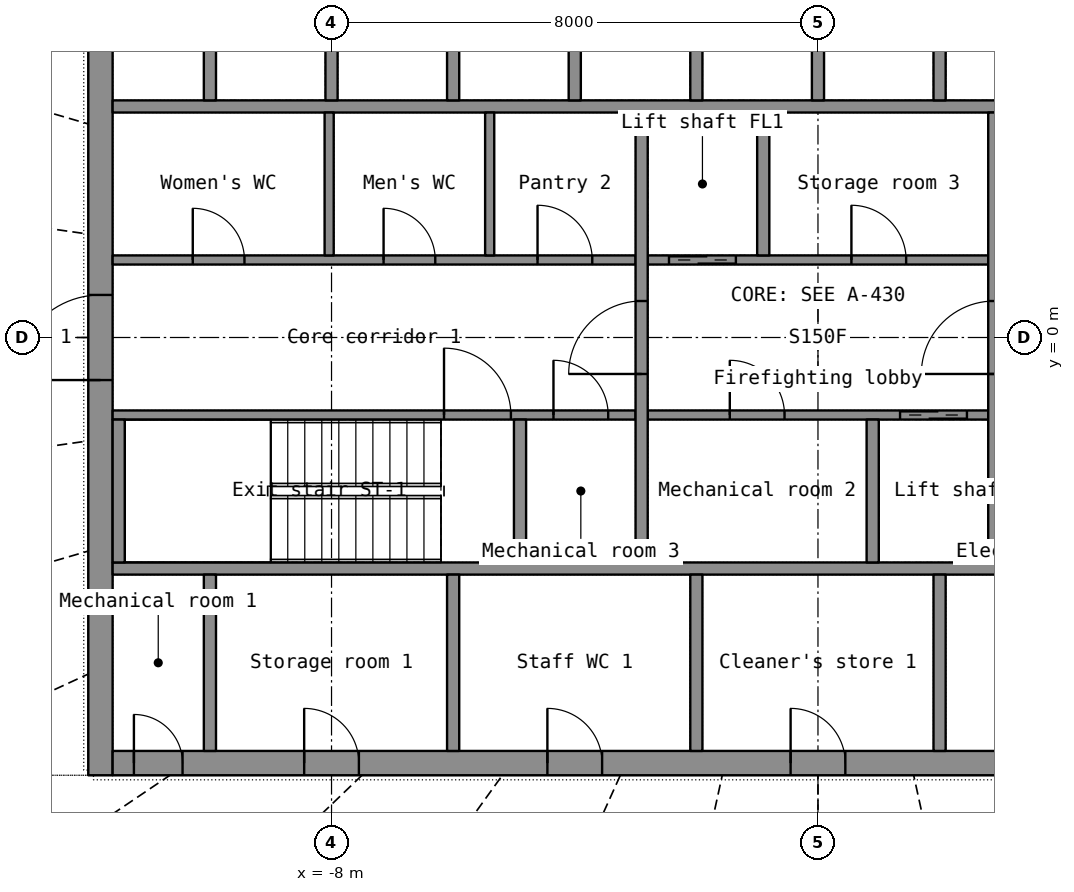
"""IFC4 building model, lengths in metres.
Left out: names, types, materials, properties, quantities, classifications, styles, units other than length and angle.
Written with IfcOpenShell. Run it as: python <this file> out.ifc"""

import sys

from ifc_helpers import new_model, si_unit, direction, frame, frame_2d, origin, place, context, subcontext, project, spatial, rectangle, extrude, element, fill, save


model = new_model("IFC4")
c1 = context("Model", 3, precision=1e-05, world=origin(), true_north=direction((0.0, 1.0)))
c2 = subcontext(c1, "Body", "Model", "MODEL_VIEW")
j1 = project(units=[si_unit("LENGTHUNIT", "METRE"), si_unit("PLANEANGLEUNIT", "RADIAN")], contexts=[c1])
p1 = place(None, origin())
s1 = spatial("IfcSite", under=j1, at=p1, CompositionType="ELEMENT")
p2 = place(p1, origin())
s2 = spatial("IfcBuilding", under=s1, at=p2, CompositionType="ELEMENT")
p3 = place(p2, frame((0.0, 0.0, 228.2)))
s3 = spatial("IfcBuildingStorey", under=s2, at=p3, CompositionType="ELEMENT", Elevation=228.2)
p4 = place(p3, frame((-11.8, -7.2, 0.0), z_axis=(0.0, 0.0, 1.0), x_axis=(0.0, 1.0, 0.0)))
e1 = element("IfcWall", 1, at=p4, inside=s3, PredefinedType="SHEAR", context=c2, shape_type="SweptSolid", body=[
    extrude(rectangle(XDim=14.4, YDim=0.4, at=frame_2d((7.2, 0.0))), origin(), (0.0, 0.0, 1.0), 3.3),
])
p5 = place(p4, frame((6.5, 0.0, 0.0)))
e2 = element("IfcOpeningElement", 2, at=p5, cuts=e1, PredefinedType="OPENING", context=c2, shape_type="SweptSolid", body=[
    extrude(rectangle(XDim=1.4, YDim=2.2, at=frame_2d((0.7, 1.1))), frame((0.0, 0.21, 0.0), z_axis=(0.0, -1.0, 0.0), x_axis=(1.0, 0.0, 0.0)), (0.0, 0.0, 1.0), 0.42),
])
p6 = place(p3, frame((-11.6, -7.0, 0.0), z_axis=(0.0, 0.0, 1.0), x_axis=(1.0, 0.0, 0.0)))
e3 = element("IfcWall", 3, at=p6, inside=s3, PredefinedType="SHEAR", context=c2, shape_type="SweptSolid", body=[
    extrude(rectangle(XDim=23.2, YDim=0.4, at=frame_2d((11.6, 0.0))), origin(), (0.0, 0.0, 1.0), 3.3),
])
p7 = place(p6, frame((20.05, 0.0, 0.0)))
e4 = element("IfcOpeningElement", 4, at=p7, cuts=e3, PredefinedType="OPENING", context=c2, shape_type="SweptSolid", body=[
    extrude(rectangle(XDim=1.1, YDim=2.2, at=frame_2d((0.55, 1.1))), frame((0.0, 0.21, 0.0), z_axis=(0.0, -1.0, 0.0), x_axis=(1.0, 0.0, 0.0)), (0.0, 0.0, 1.0), 0.42),
])
p8 = place(p6, frame((3.15, 0.0, 0.0)))
e5 = element("IfcOpeningElement", 5, at=p8, cuts=e3, PredefinedType="OPENING", context=c2, shape_type="SweptSolid", body=[
    extrude(rectangle(XDim=0.9, YDim=2.1, at=frame_2d((0.45, 1.05))), frame((0.0, 0.21, 0.0), z_axis=(0.0, -1.0, 0.0), x_axis=(1.0, 0.0, 0.0)), (0.0, 0.0, 1.0), 0.42),
])
p9 = place(p6, frame((7.15, 0.0, 0.0)))
e6 = element("IfcOpeningElement", 6, at=p9, cuts=e3, PredefinedType="OPENING", context=c2, shape_type="SweptSolid", body=[
    extrude(rectangle(XDim=0.9, YDim=2.1, at=frame_2d((0.45, 1.05))), frame((0.0, 0.21, 0.0), z_axis=(0.0, -1.0, 0.0), x_axis=(1.0, 0.0, 0.0)), (0.0, 0.0, 1.0), 0.42),
])
p10 = place(p6, frame((11.15, 0.0, 0.0)))
e7 = element("IfcOpeningElement", 7, at=p10, cuts=e3, PredefinedType="OPENING", context=c2, shape_type="SweptSolid", body=[
    extrude(rectangle(XDim=0.9, YDim=2.1, at=frame_2d((0.45, 1.05))), frame((0.0, 0.21, 0.0), z_axis=(0.0, -1.0, 0.0), x_axis=(1.0, 0.0, 0.0)), (0.0, 0.0, 1.0), 0.42),
])
p11 = place(p6, frame((16.15, 0.0, 0.0)))
e8 = element("IfcOpeningElement", 8, at=p11, cuts=e3, PredefinedType="OPENING", context=c2, shape_type="SweptSolid", body=[
    extrude(rectangle(XDim=0.9, YDim=2.1, at=frame_2d((0.45, 1.05))), frame((0.0, 0.21, 0.0), z_axis=(0.0, -1.0, 0.0), x_axis=(1.0, 0.0, 0.0)), (0.0, 0.0, 1.0), 0.42),
])
p12 = place(p6, frame((0.35, 0.0, 0.0)))
e9 = element("IfcOpeningElement", 9, at=p12, cuts=e3, PredefinedType="OPENING", context=c2, shape_type="SweptSolid", body=[
    extrude(rectangle(XDim=0.8, YDim=2.05, at=frame_2d((0.4, 1.025))), frame((0.0, 0.21, 0.0), z_axis=(0.0, -1.0, 0.0), x_axis=(1.0, 0.0, 0.0)), (0.0, 0.0, 1.0), 0.42),
])
p13 = place(p6, frame((22.05, 0.0, 0.0)))
e10 = element("IfcOpeningElement", 10, at=p13, cuts=e3, PredefinedType="OPENING", context=c2, shape_type="SweptSolid", body=[
    extrude(rectangle(XDim=0.8, YDim=2.05, at=frame_2d((0.4, 1.025))), frame((0.0, 0.21, 0.0), z_axis=(0.0, -1.0, 0.0), x_axis=(1.0, 0.0, 0.0)), (0.0, 0.0, 1.0), 0.42),
])
for number, where, z_axis, x_axis in (
    (11, (-11.6, -3.8, 0.0), (0.0, 0.0, 1.0), (1.0, 0.0, 0.0)),
    (12, (-11.6, 3.8, 0.0), (0.0, 0.0, 1.0), (1.0, 0.0, 0.0)),
):
    element("IfcWall", number, at=place(p3, frame(where, z_axis=z_axis, x_axis=x_axis)), inside=s3, PredefinedType="SHEAR", context=c2, shape_type="SweptSolid", body=[
        extrude(rectangle(XDim=23.2, YDim=0.2, at=frame_2d((11.6, 0.0))), origin(), (0.0, 0.0, 1.0), 3.3),
    ])
p14 = place(p3, frame((-10.0, -6.8, 0.0), z_axis=(0.0, 0.0, 1.0), x_axis=(0.0, 1.0, 0.0)))
e13 = element("IfcWall", 13, at=p14, inside=s3, PredefinedType="SHEAR", context=c2, shape_type="SweptSolid", body=[
    extrude(rectangle(XDim=2.9, YDim=0.2, at=frame_2d((1.45, 0.0))), origin(), (0.0, 0.0, 1.0), 3.3),
])
for number, where, z_axis, x_axis in (
    (14, (-6.0, -6.8, 0.0), (0.0, 0.0, 1.0), (0.0, 1.0, 0.0)),
    (15, (-2.0, -6.8, 0.0), (0.0, 0.0, 1.0), (0.0, 1.0, 0.0)),
    (16, (2.0, -6.8, 0.0), (0.0, 0.0, 1.0), (0.0, 1.0, 0.0)),
):
    element("IfcWall", number, at=place(p3, frame(where, z_axis=z_axis, x_axis=x_axis)), inside=s3, PredefinedType="PARTITIONING", context=c2, shape_type="SweptSolid", body=[
        extrude(rectangle(XDim=2.9, YDim=0.2, at=frame_2d((1.45, 0.0))), origin(), (0.0, 0.0, 1.0), 3.3),
    ])
for number, where, z_axis, x_axis in (
    (17, (-10.0, 3.9, 0.0), (0.0, 0.0, 1.0), (0.0, 1.0, 0.0)),
    (18, (-8.0, 3.9, 0.0), (0.0, 0.0, 1.0), (0.0, 1.0, 0.0)),
    (19, (-6.0, 3.9, 0.0), (0.0, 0.0, 1.0), (0.0, 1.0, 0.0)),
    (20, (-4.0, 3.9, 0.0), (0.0, 0.0, 1.0), (0.0, 1.0, 0.0)),
    (21, (-2.0, 3.9, 0.0), (0.0, 0.0, 1.0), (0.0, 1.0, 0.0)),
    (22, (0.0, 3.9, 0.0), (0.0, 0.0, 1.0), (0.0, 1.0, 0.0)),
    (23, (2.0, 3.9, 0.0), (0.0, 0.0, 1.0), (0.0, 1.0, 0.0)),
):
    element("IfcWall", number, at=place(p3, frame(where, z_axis=z_axis, x_axis=x_axis)), inside=s3, PredefinedType="SHEAR", context=c2, shape_type="SweptSolid", body=[
        extrude(rectangle(XDim=2.9, YDim=0.2, at=frame_2d((1.45, 0.0))), origin(), (0.0, 0.0, 1.0), 3.3),
    ])
p15 = place(p3, frame((-11.6, -1.275, 0.0), z_axis=(0.0, 0.0, 1.0), x_axis=(1.0, 0.0, 0.0)))
e24 = element("IfcWall", 24, at=p15, inside=s3, PredefinedType="SHEAR", context=c2, shape_type="SweptSolid", body=[
    extrude(rectangle(XDim=8.6, YDim=0.15, at=frame_2d((4.3, 0.0))), origin(), (0.0, 0.0, 1.0), 3.3),
])
p16 = place(p15, frame((5.45, 0.0, 0.0)))
e25 = element("IfcOpeningElement", 25, at=p16, cuts=e24, PredefinedType="OPENING", context=c2, shape_type="SweptSolid", body=[
    extrude(rectangle(XDim=1.1, YDim=2.15, at=frame_2d((0.55, 1.075))), frame((0.0, 0.085, 0.0), z_axis=(0.0, -1.0, 0.0), x_axis=(1.0, 0.0, 0.0)), (0.0, 0.0, 1.0), 0.17),
])
p17 = place(p15, frame((7.25, 0.0, 0.0)))
e26 = element("IfcOpeningElement", 26, at=p17, cuts=e24, PredefinedType="OPENING", context=c2, shape_type="SweptSolid", body=[
    extrude(rectangle(XDim=0.9, YDim=2.1, at=frame_2d((0.45, 1.05))), frame((0.0, 0.085, 0.0), z_axis=(0.0, -1.0, 0.0), x_axis=(1.0, 0.0, 0.0)), (0.0, 0.0, 1.0), 0.17),
])
p18 = place(p3, frame((-2.8, -1.275, 0.0), z_axis=(0.0, 0.0, 1.0), x_axis=(1.0, 0.0, 0.0)))
e27 = element("IfcWall", 27, at=p18, inside=s3, PredefinedType="SHEAR", context=c2, shape_type="SweptSolid", body=[
    extrude(rectangle(XDim=5.6, YDim=0.15, at=frame_2d((2.8, 0.0))), origin(), (0.0, 0.0, 1.0), 3.3),
])
p19 = place(p18, frame((4.15, 0.0, 0.0)))
e28 = element("IfcOpeningElement", 28, at=p19, cuts=e27, PredefinedType="OPENING", context=c2, shape_type="SweptSolid", body=[
    extrude(rectangle(XDim=1.1, YDim=2.2, at=frame_2d((0.55, 1.1))), frame((0.0, 0.085, 0.0), z_axis=(0.0, -1.0, 0.0), x_axis=(1.0, 0.0, 0.0)), (0.0, 0.0, 1.0), 0.17),
])
p20 = place(p18, frame((1.35, 0.0, 0.0)))
e29 = element("IfcOpeningElement", 29, at=p20, cuts=e27, PredefinedType="OPENING", context=c2, shape_type="SweptSolid", body=[
    extrude(rectangle(XDim=0.9, YDim=2.1, at=frame_2d((0.45, 1.05))), frame((0.0, 0.085, 0.0), z_axis=(0.0, -1.0, 0.0), x_axis=(1.0, 0.0, 0.0)), (0.0, 0.0, 1.0), 0.17),
])
p21 = place(p3, frame((-11.6, 1.275, 0.0), z_axis=(0.0, 0.0, 1.0), x_axis=(1.0, 0.0, 0.0)))
e30 = element("IfcWall", 30, at=p21, inside=s3, PredefinedType="PARTITIONING", context=c2, shape_type="SweptSolid", body=[
    extrude(rectangle(XDim=8.6, YDim=0.15, at=frame_2d((4.3, 0.0))), origin(), (0.0, 0.0, 1.0), 3.3),
])
p22 = place(p21, frame((1.318, 0.0, 0.0)))
e31 = element("IfcOpeningElement", 31, at=p22, cuts=e30, PredefinedType="OPENING", context=c2, shape_type="SweptSolid", body=[
    extrude(rectangle(XDim=0.85, YDim=2.1, at=frame_2d((0.425, 1.05))), frame((0.0, 0.085, 0.0), z_axis=(0.0, -1.0, 0.0), x_axis=(1.0, 0.0, 0.0)), (0.0, 0.0, 1.0), 0.17),
])
p23 = place(p21, frame((4.456, 0.0, 0.0)))
e32 = element("IfcOpeningElement", 32, at=p23, cuts=e30, PredefinedType="OPENING", context=c2, shape_type="SweptSolid", body=[
    extrude(rectangle(XDim=0.85, YDim=2.1, at=frame_2d((0.425, 1.05))), frame((0.0, 0.085, 0.0), z_axis=(0.0, -1.0, 0.0), x_axis=(1.0, 0.0, 0.0)), (0.0, 0.0, 1.0), 0.17),
])
p24 = place(p21, frame((6.988, 0.0, 0.0)))
e33 = element("IfcOpeningElement", 33, at=p24, cuts=e30, PredefinedType="OPENING", context=c2, shape_type="SweptSolid", body=[
    extrude(rectangle(XDim=0.9, YDim=2.1, at=frame_2d((0.45, 1.05))), frame((0.0, 0.085, 0.0), z_axis=(0.0, -1.0, 0.0), x_axis=(1.0, 0.0, 0.0)), (0.0, 0.0, 1.0), 0.17),
])
p25 = place(p3, frame((-2.8, 1.275, 0.0), z_axis=(0.0, 0.0, 1.0), x_axis=(1.0, 0.0, 0.0)))
e34 = element("IfcWall", 34, at=p25, inside=s3, PredefinedType="SHEAR", context=c2, shape_type="SweptSolid", body=[
    extrude(rectangle(XDim=5.6, YDim=0.15, at=frame_2d((2.8, 0.0))), origin(), (0.0, 0.0, 1.0), 3.3),
])
p26 = place(p25, frame((0.35, 0.0, 0.0)))
e35 = element("IfcOpeningElement", 35, at=p26, cuts=e34, PredefinedType="OPENING", context=c2, shape_type="SweptSolid", body=[
    extrude(rectangle(XDim=1.1, YDim=2.2, at=frame_2d((0.55, 1.1))), frame((0.0, 0.085, 0.0), z_axis=(0.0, -1.0, 0.0), x_axis=(1.0, 0.0, 0.0)), (0.0, 0.0, 1.0), 0.17),
])
p27 = place(p25, frame((3.35, 0.0, 0.0)))
e36 = element("IfcOpeningElement", 36, at=p27, cuts=e34, PredefinedType="OPENING", context=c2, shape_type="SweptSolid", body=[
    extrude(rectangle(XDim=0.9, YDim=2.1, at=frame_2d((0.45, 1.05))), frame((0.0, 0.085, 0.0), z_axis=(0.0, -1.0, 0.0), x_axis=(1.0, 0.0, 0.0)), (0.0, 0.0, 1.0), 0.17),
])
p28 = place(p3, frame((-2.9, -3.7, 0.0), z_axis=(0.0, 0.0, 1.0), x_axis=(0.0, 1.0, 0.0)))
e37 = element("IfcWall", 37, at=p28, inside=s3, PredefinedType="SHEAR", context=c2, shape_type="SweptSolid", body=[
    extrude(rectangle(XDim=7.4, YDim=0.2, at=frame_2d((3.7, 0.0))), origin(), (0.0, 0.0, 1.0), 3.3),
])
p29 = place(p28, frame((3.1, 0.0, 0.0)))
e38 = element("IfcOpeningElement", 38, at=p29, cuts=e37, PredefinedType="OPENING", context=c2, shape_type="SweptSolid", body=[
    extrude(rectangle(XDim=1.2, YDim=2.2, at=frame_2d((0.6, 1.1))), frame((0.0, 0.11, 0.0), z_axis=(0.0, -1.0, 0.0), x_axis=(1.0, 0.0, 0.0)), (0.0, 0.0, 1.0), 0.22),
])
p30 = place(p3, frame((2.9, -3.7, 0.0), z_axis=(0.0, 0.0, 1.0), x_axis=(0.0, 1.0, 0.0)))
e39 = element("IfcWall", 39, at=p30, inside=s3, PredefinedType="SHEAR", context=c2, shape_type="SweptSolid", body=[
    extrude(rectangle(XDim=7.4, YDim=0.2, at=frame_2d((3.7, 0.0))), origin(), (0.0, 0.0, 1.0), 3.3),
])
p31 = place(p30, frame((3.1, 0.0, 0.0)))
e40 = element("IfcOpeningElement", 40, at=p31, cuts=e39, PredefinedType="OPENING", context=c2, shape_type="SweptSolid", body=[
    extrude(rectangle(XDim=1.2, YDim=2.2, at=frame_2d((0.6, 1.1))), frame((0.0, 0.11, 0.0), z_axis=(0.0, -1.0, 0.0), x_axis=(1.0, 0.0, 0.0)), (0.0, 0.0, 1.0), 0.22),
])
for number, where, z_axis, x_axis in (
    (41, (-0.9, 1.35, 0.0), (0.0, 0.0, 1.0), (0.0, 1.0, 0.0)),
    (42, (0.9, -3.7, 0.0), (0.0, 0.0, 1.0), (0.0, 1.0, 0.0)),
    (43, (-11.5, -3.7, 0.0), (0.0, 0.0, 1.0), (0.0, 1.0, 0.0)),
    (44, (-4.9, -3.7, 0.0), (0.0, 0.0, 1.0), (0.0, 1.0, 0.0)),
):
    element("IfcWall", number, at=place(p3, frame(where, z_axis=z_axis, x_axis=x_axis)), inside=s3, PredefinedType="SHEAR", context=c2, shape_type="SweptSolid", body=[
        extrude(rectangle(XDim=2.35, YDim=0.2, at=frame_2d((1.175, 0.0))), origin(), (0.0, 0.0, 1.0), 3.3),
    ])
for number, where, z_axis, x_axis in (
    (45, (-8.039, 1.35, 0.0), (0.0, 0.0, 1.0), (0.0, 1.0, 0.0)),
    (46, (-5.399, 1.35, 0.0), (0.0, 0.0, 1.0), (0.0, 1.0, 0.0)),
):
    element("IfcWall", number, at=place(p3, frame(where, z_axis=z_axis, x_axis=x_axis)), inside=s3, PredefinedType="PARTITIONING", context=c2, shape_type="SweptSolid", body=[
        extrude(rectangle(XDim=2.35, YDim=0.15, at=frame_2d((1.175, 0.0))), origin(), (0.0, 0.0, 1.0), 3.3),
    ])
p32 = place(p8, origin())
e47 = element("IfcDoor", 47, at=p32, inside=s3, OperationType="SINGLE_SWING_LEFT", PredefinedType="DOOR", context=c2, shape_type="SweptSolid", body=[
    extrude(rectangle(XDim=0.9, YDim=2.1, at=frame_2d((0.45, 1.05))), frame((0.0, 0.025, 0.0), z_axis=(0.0, -1.0, 0.0), x_axis=(1.0, 0.0, 0.0)), (0.0, 0.0, 1.0), 0.05),
])
fill(e5, e47)
p33 = place(p9, origin())
e48 = element("IfcDoor", 48, at=p33, inside=s3, OperationType="SINGLE_SWING_LEFT", PredefinedType="DOOR", context=c2, shape_type="SweptSolid", body=[
    extrude(rectangle(XDim=0.9, YDim=2.1, at=frame_2d((0.45, 1.05))), frame((0.0, 0.025, 0.0), z_axis=(0.0, -1.0, 0.0), x_axis=(1.0, 0.0, 0.0)), (0.0, 0.0, 1.0), 0.05),
])
fill(e6, e48)
p34 = place(p10, origin())
e49 = element("IfcDoor", 49, at=p34, inside=s3, OperationType="SINGLE_SWING_LEFT", PredefinedType="DOOR", context=c2, shape_type="SweptSolid", body=[
    extrude(rectangle(XDim=0.9, YDim=2.1, at=frame_2d((0.45, 1.05))), frame((0.0, 0.025, 0.0), z_axis=(0.0, -1.0, 0.0), x_axis=(1.0, 0.0, 0.0)), (0.0, 0.0, 1.0), 0.05),
])
fill(e7, e49)
p35 = place(p12, origin())
e50 = element("IfcDoor", 50, at=p35, inside=s3, OperationType="SINGLE_SWING_LEFT", PredefinedType="DOOR", context=c2, shape_type="SweptSolid", body=[
    extrude(rectangle(XDim=0.8, YDim=2.05, at=frame_2d((0.4, 1.025))), frame((0.0, 0.025, 0.0), z_axis=(0.0, -1.0, 0.0), x_axis=(1.0, 0.0, 0.0)), (0.0, 0.0, 1.0), 0.05),
])
fill(e9, e50)
p36 = place(p5, origin())
e51 = element("IfcDoor", 51, at=p36, inside=s3, OperationType="DOUBLE_DOOR_SINGLE_SWING", PredefinedType="DOOR", context=c2, shape_type="SweptSolid", body=[
    extrude(rectangle(XDim=1.4, YDim=2.2, at=frame_2d((0.7, 1.1))), frame((0.0, 0.025, 0.0), z_axis=(0.0, -1.0, 0.0), x_axis=(1.0, 0.0, 0.0)), (0.0, 0.0, 1.0), 0.05),
])
fill(e2, e51)
p37 = place(p29, origin())
e52 = element("IfcDoor", 52, at=p37, inside=s3, OperationType="SINGLE_SWING_LEFT", PredefinedType="DOOR", context=c2, shape_type="SweptSolid", body=[
    extrude(rectangle(XDim=1.2, YDim=2.2, at=frame_2d((0.6, 1.1))), frame((0.0, 0.025, 0.0), z_axis=(0.0, -1.0, 0.0), x_axis=(1.0, 0.0, 0.0)), (0.0, 0.0, 1.0), 0.05),
])
fill(e38, e52)
p38 = place(p31, origin())
e53 = element("IfcDoor", 53, at=p38, inside=s3, OperationType="SINGLE_SWING_LEFT", PredefinedType="DOOR", context=c2, shape_type="SweptSolid", body=[
    extrude(rectangle(XDim=1.2, YDim=2.2, at=frame_2d((0.6, 1.1))), frame((0.0, 0.025, 0.0), z_axis=(0.0, -1.0, 0.0), x_axis=(1.0, 0.0, 0.0)), (0.0, 0.0, 1.0), 0.05),
])
fill(e40, e53)
p39 = place(p26, origin())
e54 = element("IfcDoor", 54, at=p39, inside=s3, OperationType="DOUBLE_DOOR_SLIDING", PredefinedType="DOOR", context=c2, shape_type="SweptSolid", body=[
    extrude(rectangle(XDim=1.1, YDim=2.2, at=frame_2d((0.55, 1.1))), frame((0.0, 0.025, 0.0), z_axis=(0.0, -1.0, 0.0), x_axis=(1.0, 0.0, 0.0)), (0.0, 0.0, 1.0), 0.05),
])
fill(e35, e54)
p40 = place(p19, origin())
e55 = element("IfcDoor", 55, at=p40, inside=s3, OperationType="DOUBLE_DOOR_SLIDING", PredefinedType="DOOR", context=c2, shape_type="SweptSolid", body=[
    extrude(rectangle(XDim=1.1, YDim=2.2, at=frame_2d((0.55, 1.1))), frame((0.0, 0.025, 0.0), z_axis=(0.0, -1.0, 0.0), x_axis=(1.0, 0.0, 0.0)), (0.0, 0.0, 1.0), 0.05),
])
fill(e28, e55)
p41 = place(p16, origin())
e56 = element("IfcDoor", 56, at=p41, inside=s3, OperationType="SINGLE_SWING_LEFT", PredefinedType="DOOR", context=c2, shape_type="SweptSolid", body=[
    extrude(rectangle(XDim=1.1, YDim=2.15, at=frame_2d((0.55, 1.075))), frame((0.0, 0.025, 0.0), z_axis=(0.0, -1.0, 0.0), x_axis=(1.0, 0.0, 0.0)), (0.0, 0.0, 1.0), 0.05),
])
fill(e25, e56)
p42 = place(p22, origin())
e57 = element("IfcDoor", 57, at=p42, inside=s3, OperationType="SINGLE_SWING_LEFT", PredefinedType="DOOR", context=c2, shape_type="SweptSolid", body=[
    extrude(rectangle(XDim=0.85, YDim=2.1, at=frame_2d((0.425, 1.05))), frame((0.0, 0.025, 0.0), z_axis=(0.0, -1.0, 0.0), x_axis=(1.0, 0.0, 0.0)), (0.0, 0.0, 1.0), 0.05),
])
fill(e31, e57)
p43 = place(p23, origin())
e58 = element("IfcDoor", 58, at=p43, inside=s3, OperationType="SINGLE_SWING_LEFT", PredefinedType="DOOR", context=c2, shape_type="SweptSolid", body=[
    extrude(rectangle(XDim=0.85, YDim=2.1, at=frame_2d((0.425, 1.05))), frame((0.0, 0.025, 0.0), z_axis=(0.0, -1.0, 0.0), x_axis=(1.0, 0.0, 0.0)), (0.0, 0.0, 1.0), 0.05),
])
fill(e32, e58)
p44 = place(p24, origin())
e59 = element("IfcDoor", 59, at=p44, inside=s3, OperationType="SINGLE_SWING_LEFT", PredefinedType="DOOR", context=c2, shape_type="SweptSolid", body=[
    extrude(rectangle(XDim=0.9, YDim=2.1, at=frame_2d((0.45, 1.05))), frame((0.0, 0.025, 0.0), z_axis=(0.0, -1.0, 0.0), x_axis=(1.0, 0.0, 0.0)), (0.0, 0.0, 1.0), 0.05),
])
fill(e33, e59)
p45 = place(p27, origin())
e60 = element("IfcDoor", 60, at=p45, inside=s3, OperationType="SINGLE_SWING_LEFT", PredefinedType="DOOR", context=c2, shape_type="SweptSolid", body=[
    extrude(rectangle(XDim=0.9, YDim=2.1, at=frame_2d((0.45, 1.05))), frame((0.0, 0.025, 0.0), z_axis=(0.0, -1.0, 0.0), x_axis=(1.0, 0.0, 0.0)), (0.0, 0.0, 1.0), 0.05),
])
fill(e36, e60)
p46 = place(p20, origin())
e61 = element("IfcDoor", 61, at=p46, inside=s3, OperationType="SINGLE_SWING_LEFT", PredefinedType="DOOR", context=c2, shape_type="SweptSolid", body=[
    extrude(rectangle(XDim=0.9, YDim=2.1, at=frame_2d((0.45, 1.05))), frame((0.0, 0.025, 0.0), z_axis=(0.0, -1.0, 0.0), x_axis=(1.0, 0.0, 0.0)), (0.0, 0.0, 1.0), 0.05),
])
fill(e29, e61)
p47 = place(p17, origin())
e62 = element("IfcDoor", 62, at=p47, inside=s3, OperationType="SINGLE_SWING_LEFT", PredefinedType="DOOR", context=c2, shape_type="SweptSolid", body=[
    extrude(rectangle(XDim=0.9, YDim=2.1, at=frame_2d((0.45, 1.05))), frame((0.0, 0.025, 0.0), z_axis=(0.0, -1.0, 0.0), x_axis=(1.0, 0.0, 0.0)), (0.0, 0.0, 1.0), 0.05),
])
fill(e26, e62)
save(model, sys.argv[1])
